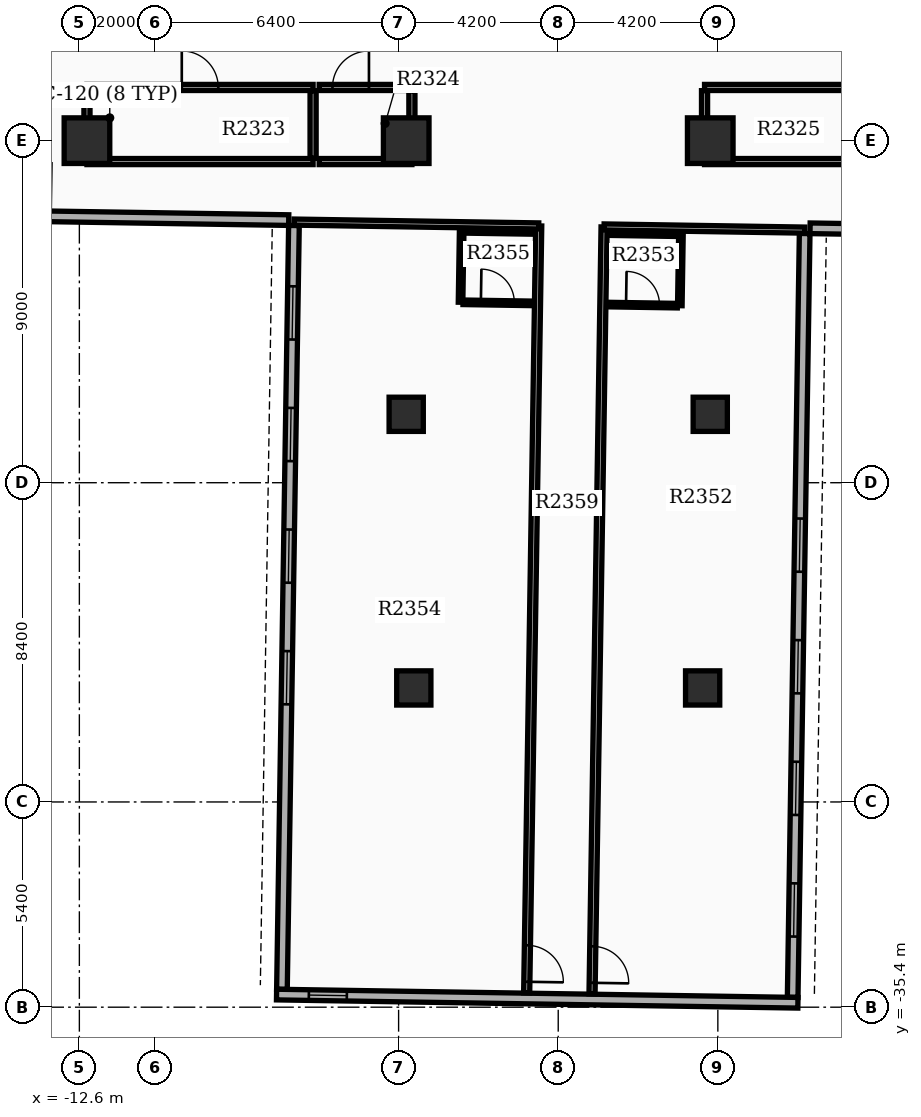
"""IFC4 building model, lengths in metres.
Left out: names, types, materials, properties, quantities, classifications, styles, units other than length and angle.
Written with IfcOpenShell. Run it as: python <this file> out.ifc"""

import sys

from ifc_helpers import new_model, si_unit, direction, frame, frame_2d, origin, origin_2d, place, context, subcontext, project, spatial, rectangle, extrude, element, fill, save


model = new_model("IFC4")
c1 = context("Model", 3, precision=1e-05, world=origin(), true_north=direction((0.0, 1.0)))
c2 = subcontext(c1, "Body", "Model", "MODEL_VIEW")
j1 = project(units=[si_unit("LENGTHUNIT", "METRE"), si_unit("PLANEANGLEUNIT", "RADIAN")], contexts=[c1])
p1 = place(None, origin())
s1 = spatial("IfcSite", under=j1, at=p1, CompositionType="ELEMENT")
p2 = place(p1, origin())
s2 = spatial("IfcBuilding", under=s1, at=p2, CompositionType="ELEMENT")
p3 = place(p2, frame((0.0, 0.0, 148.8)))
s3 = spatial("IfcBuildingStorey", under=s2, at=p3, CompositionType="ELEMENT", Elevation=148.8)
for number, where, z_axis, x_axis in (
    (1, (-12.4, -12.6, 0.0), (0.0, 0.0, 1.0), (1.0, 0.0, 0.0)),
    (2, (-4.0, -12.6, 0.0), (0.0, 0.0, 1.0), (1.0, 0.0, 0.0)),
    (3, (4.0, -12.6, 0.0), (0.0, 0.0, 1.0), (1.0, 0.0, 0.0)),
):
    element("IfcColumn", number, at=place(p3, frame(where, z_axis=z_axis, x_axis=x_axis)), inside=s3, PredefinedType="COLUMN", context=c2, shape_type="SweptSolid", body=[
        extrude(rectangle(XDim=1.2, YDim=1.2, at=origin_2d()), origin(), (0.0, 0.0, 1.0), 3.9),
    ])
for number, where, z_axis, x_axis in (
    (4, (-4.0, -19.8, 0.0), (0.0, 0.0, 1.0), (1.0, 0.0, 0.0)),
    (5, (4.0, -19.8, 0.0), (0.0, 0.0, 1.0), (1.0, 0.0, 0.0)),
    (6, (-3.8, -27.0, 0.0), (0.0, 0.0, 1.0), (1.0, 0.0, 0.0)),
    (7, (3.8, -27.0, 0.0), (0.0, 0.0, 1.0), (1.0, 0.0, 0.0)),
):
    element("IfcColumn", number, at=place(p3, frame(where, z_axis=z_axis, x_axis=x_axis)), inside=s3, PredefinedType="COLUMN", context=c2, shape_type="SweptSolid", body=[
        extrude(rectangle(XDim=0.9, YDim=0.9, at=origin_2d()), origin(), (0.0, 0.0, 1.0), 3.9),
    ])
p4 = place(p3, frame((-6.954, -14.833, 0.0), z_axis=(0.0, 0.0, 1.0), x_axis=(-0.015705059908, -0.999876667941, 0.0)))
e8 = element("IfcWall", 8, at=p4, inside=s3, PredefinedType="STANDARD", context=c2, shape_type="SweptSolid", body=[
    extrude(rectangle(XDim=20.1, YDim=0.28, at=frame_2d((10.05, 0.0))), origin(), (0.0, 0.0, 1.0), 2.97),
])
p5 = place(p4, frame((1.6, 0.0, 0.8)))
e9 = element("IfcOpeningElement", 9, at=p5, cuts=e8, PredefinedType="OPENING", context=c2, shape_type="SweptSolid", body=[
    extrude(rectangle(XDim=1.4, YDim=1.6, at=frame_2d((0.7, 0.8))), frame((0.0, 0.15, 0.0), z_axis=(0.0, -1.0, 0.0), x_axis=(1.0, 0.0, 0.0)), (0.0, 0.0, 1.0), 0.3),
])
p6 = place(p4, frame((4.8, 0.0, 0.8)))
e10 = element("IfcOpeningElement", 10, at=p6, cuts=e8, PredefinedType="OPENING", context=c2, shape_type="SweptSolid", body=[
    extrude(rectangle(XDim=1.4, YDim=1.6, at=frame_2d((0.7, 0.8))), frame((0.0, 0.15, 0.0), z_axis=(0.0, -1.0, 0.0), x_axis=(1.0, 0.0, 0.0)), (0.0, 0.0, 1.0), 0.3),
])
p7 = place(p4, frame((8.0, 0.0, 0.8)))
e11 = element("IfcOpeningElement", 11, at=p7, cuts=e8, PredefinedType="OPENING", context=c2, shape_type="SweptSolid", body=[
    extrude(rectangle(XDim=1.4, YDim=1.6, at=frame_2d((0.7, 0.8))), frame((0.0, 0.15, 0.0), z_axis=(0.0, -1.0, 0.0), x_axis=(1.0, 0.0, 0.0)), (0.0, 0.0, 1.0), 0.3),
])
p8 = place(p4, frame((11.2, 0.0, 0.8)))
e12 = element("IfcOpeningElement", 12, at=p8, cuts=e8, PredefinedType="OPENING", context=c2, shape_type="SweptSolid", body=[
    extrude(rectangle(XDim=1.4, YDim=1.6, at=frame_2d((0.7, 0.8))), frame((0.0, 0.15, 0.0), z_axis=(0.0, -1.0, 0.0), x_axis=(1.0, 0.0, 0.0)), (0.0, 0.0, 1.0), 0.3),
])
p9 = place(p3, frame((6.169, -35.141, 0.0), z_axis=(0.0, 0.0, 1.0), x_axis=(0.01571739401, 0.999876474133, 0.0)))
e13 = element("IfcWall", 13, at=p9, inside=s3, PredefinedType="STANDARD", context=c2, shape_type="SweptSolid", body=[
    extrude(rectangle(XDim=20.1, YDim=0.28, at=frame_2d((10.05, 0.0))), origin(), (0.0, 0.0, 1.0), 2.97),
])
p10 = place(p9, frame((1.6, 0.0, 0.8)))
e14 = element("IfcOpeningElement", 14, at=p10, cuts=e13, PredefinedType="OPENING", context=c2, shape_type="SweptSolid", body=[
    extrude(rectangle(XDim=1.4, YDim=1.6, at=frame_2d((0.7, 0.8))), frame((0.0, 0.15, 0.0), z_axis=(0.0, -1.0, 0.0), x_axis=(1.0, 0.0, 0.0)), (0.0, 0.0, 1.0), 0.3),
])
p11 = place(p9, frame((4.8, 0.0, 0.8)))
e15 = element("IfcOpeningElement", 15, at=p11, cuts=e13, PredefinedType="OPENING", context=c2, shape_type="SweptSolid", body=[
    extrude(rectangle(XDim=1.4, YDim=1.6, at=frame_2d((0.7, 0.8))), frame((0.0, 0.15, 0.0), z_axis=(0.0, -1.0, 0.0), x_axis=(1.0, 0.0, 0.0)), (0.0, 0.0, 1.0), 0.3),
])
p12 = place(p9, frame((8.0, 0.0, 0.8)))
e16 = element("IfcOpeningElement", 16, at=p12, cuts=e13, PredefinedType="OPENING", context=c2, shape_type="SweptSolid", body=[
    extrude(rectangle(XDim=1.4, YDim=1.6, at=frame_2d((0.7, 0.8))), frame((0.0, 0.15, 0.0), z_axis=(0.0, -1.0, 0.0), x_axis=(1.0, 0.0, 0.0)), (0.0, 0.0, 1.0), 0.3),
])
p13 = place(p9, frame((11.2, 0.0, 0.8)))
e17 = element("IfcOpeningElement", 17, at=p13, cuts=e13, PredefinedType="OPENING", context=c2, shape_type="SweptSolid", body=[
    extrude(rectangle(XDim=1.4, YDim=1.6, at=frame_2d((0.7, 0.8))), frame((0.0, 0.15, 0.0), z_axis=(0.0, -1.0, 0.0), x_axis=(1.0, 0.0, 0.0)), (0.0, 0.0, 1.0), 0.3),
])
p14 = place(p3, frame((-7.412, -35.068, 0.0), z_axis=(0.0, 0.0, 1.0), x_axis=(0.999876549481, -0.015712599986, 0.0)))
e18 = element("IfcWall", 18, at=p14, inside=s3, PredefinedType="STANDARD", context=c2, shape_type="SweptSolid", body=[
    extrude(rectangle(XDim=13.72, YDim=0.28, at=frame_2d((6.86, 0.0))), origin(), (0.0, 0.0, 1.0), 2.97),
])
p15 = place(p14, frame((0.85, 0.0, 0.85)))
e19 = element("IfcOpeningElement", 19, at=p15, cuts=e18, PredefinedType="OPENING", context=c2, shape_type="SweptSolid", body=[
    extrude(rectangle(XDim=1.0, YDim=1.5, at=frame_2d((0.5, 0.75))), frame((0.0, 0.15, 0.0), z_axis=(0.0, -1.0, 0.0), x_axis=(1.0, 0.0, 0.0)), (0.0, 0.0, 1.0), 0.3),
])
p16 = place(p3, frame((-13.391, -14.592, 0.0), z_axis=(0.0, 0.0, 1.0), x_axis=(0.999876833368, -0.015694524359, 0.0)))
e20 = element("IfcWall", 20, at=p16, inside=s3, PredefinedType="STANDARD", context=c2, shape_type="SweptSolid", body=[
    extrude(rectangle(XDim=6.3, YDim=0.28, at=frame_2d((3.15, 0.0))), origin(), (0.0, 0.0, 1.0), 2.97),
])
p17 = place(p3, frame((12.926, -15.005, 0.0), z_axis=(0.0, 0.0, 1.0), x_axis=(-0.999876823822, 0.015695132501, 0.0)))
e21 = element("IfcWall", 21, at=p17, inside=s3, PredefinedType="STANDARD", context=c2, shape_type="SweptSolid", body=[
    extrude(rectangle(XDim=6.3, YDim=0.28, at=frame_2d((3.15, 0.0))), origin(), (0.0, 0.0, 1.0), 2.97),
])
p18 = place(p3, frame((-12.4, -13.15, 0.0), z_axis=(0.0, 0.0, 1.0), x_axis=(1.0, 0.0, 0.0)))
e22 = element("IfcWall", 22, at=p18, inside=s3, PredefinedType="PARTITIONING", context=c2, shape_type="SweptSolid", body=[
    extrude(rectangle(XDim=5.95, YDim=0.16, at=frame_2d((2.975, 0.0))), origin(), (0.0, 0.0, 1.0), 2.96),
])
p19 = place(p3, frame((-12.4, -11.2, 0.0), z_axis=(0.0, 0.0, 1.0), x_axis=(1.0, 0.0, 0.0)))
e23 = element("IfcWall", 23, at=p19, inside=s3, PredefinedType="PARTITIONING", context=c2, shape_type="SweptSolid", body=[
    extrude(rectangle(XDim=5.95, YDim=0.16, at=frame_2d((2.975, 0.0))), origin(), (0.0, 0.0, 1.0), 2.96),
])
p20 = place(p19, frame((2.495, 0.0, 0.0)))
e24 = element("IfcOpeningElement", 24, at=p20, cuts=e23, PredefinedType="OPENING", context=c2, shape_type="SweptSolid", body=[
    extrude(rectangle(XDim=0.96, YDim=2.15, at=frame_2d((0.48, 1.075))), frame((0.0, 0.09, 0.0), z_axis=(0.0, -1.0, 0.0), x_axis=(1.0, 0.0, 0.0)), (0.0, 0.0, 1.0), 0.18),
])
for number, where, z_axis, x_axis in (
    (25, (-12.4, -13.065, 0.0), (0.0, 0.0, 1.0), (0.0, 1.0, 0.0)),
    (26, (-6.45, -13.065, 0.0), (0.0, 0.0, 1.0), (0.0, 1.0, 0.0)),
):
    element("IfcWall", number, at=place(p3, frame(where, z_axis=z_axis, x_axis=x_axis)), inside=s3, PredefinedType="PARTITIONING", context=c2, shape_type="SweptSolid", body=[
        extrude(rectangle(XDim=1.78, YDim=0.16, at=frame_2d((0.89, 0.0))), origin(), (0.0, 0.0, 1.0), 2.96),
    ])
p21 = place(p3, frame((-6.29, -13.15, 0.0), z_axis=(0.0, 0.0, 1.0), x_axis=(1.0, 0.0, 0.0)))
e27 = element("IfcWall", 27, at=p21, inside=s3, PredefinedType="PARTITIONING", context=c2, shape_type="SweptSolid", body=[
    extrude(rectangle(XDim=2.44, YDim=0.16, at=frame_2d((1.22, 0.0))), origin(), (0.0, 0.0, 1.0), 2.96),
])
p22 = place(p3, frame((-6.29, -11.2, 0.0), z_axis=(0.0, 0.0, 1.0), x_axis=(1.0, 0.0, 0.0)))
e28 = element("IfcWall", 28, at=p22, inside=s3, PredefinedType="PARTITIONING", context=c2, shape_type="SweptSolid", body=[
    extrude(rectangle(XDim=2.44, YDim=0.16, at=frame_2d((1.22, 0.0))), origin(), (0.0, 0.0, 1.0), 2.96),
])
p23 = place(p22, frame((0.35, 0.0, 0.0)))
e29 = element("IfcOpeningElement", 29, at=p23, cuts=e28, PredefinedType="OPENING", context=c2, shape_type="SweptSolid", body=[
    extrude(rectangle(XDim=0.96, YDim=2.15, at=frame_2d((0.48, 1.075))), frame((0.0, 0.09, 0.0), z_axis=(0.0, -1.0, 0.0), x_axis=(1.0, 0.0, 0.0)), (0.0, 0.0, 1.0), 0.18),
])
p24 = place(p3, frame((-3.85, -13.065, 0.0), z_axis=(0.0, 0.0, 1.0), x_axis=(0.0, 1.0, 0.0)))
e30 = element("IfcWall", 30, at=p24, inside=s3, PredefinedType="PARTITIONING", context=c2, shape_type="SweptSolid", body=[
    extrude(rectangle(XDim=1.78, YDim=0.16, at=frame_2d((0.89, 0.0))), origin(), (0.0, 0.0, 1.0), 2.96),
])
p25 = place(p3, frame((3.85, -13.15, 0.0), z_axis=(0.0, 0.0, 1.0), x_axis=(1.0, 0.0, 0.0)))
e31 = element("IfcWall", 31, at=p25, inside=s3, PredefinedType="PARTITIONING", context=c2, shape_type="SweptSolid", body=[
    extrude(rectangle(XDim=8.55, YDim=0.16, at=frame_2d((4.275, 0.0))), origin(), (0.0, 0.0, 1.0), 2.96),
])
p26 = place(p3, frame((3.85, -11.2, 0.0), z_axis=(0.0, 0.0, 1.0), x_axis=(1.0, 0.0, 0.0)))
e32 = element("IfcWall", 32, at=p26, inside=s3, PredefinedType="PARTITIONING", context=c2, shape_type="SweptSolid", body=[
    extrude(rectangle(XDim=8.55, YDim=0.16, at=frame_2d((4.275, 0.0))), origin(), (0.0, 0.0, 1.0), 2.96),
])
p27 = place(p26, frame((3.795, 0.0, 0.0)))
e33 = element("IfcOpeningElement", 33, at=p27, cuts=e32, PredefinedType="OPENING", context=c2, shape_type="SweptSolid", body=[
    extrude(rectangle(XDim=0.96, YDim=2.15, at=frame_2d((0.48, 1.075))), frame((0.0, 0.09, 0.0), z_axis=(0.0, -1.0, 0.0), x_axis=(1.0, 0.0, 0.0)), (0.0, 0.0, 1.0), 0.18),
])
p28 = place(p3, frame((3.85, -13.065, 0.0), z_axis=(0.0, 0.0, 1.0), x_axis=(0.0, 1.0, 0.0)))
e34 = element("IfcWall", 34, at=p28, inside=s3, PredefinedType="PARTITIONING", context=c2, shape_type="SweptSolid", body=[
    extrude(rectangle(XDim=1.78, YDim=0.16, at=frame_2d((0.89, 0.0))), origin(), (0.0, 0.0, 1.0), 2.96),
])
p29 = place(p3, frame((1.207, -14.871, 0.0), z_axis=(0.0, 0.0, 1.0), x_axis=(-0.015713987169, -0.999876527681, 0.0)))
e35 = element("IfcWall", 35, at=p29, inside=s3, PredefinedType="PARTITIONING", context=c2, shape_type="SweptSolid", body=[
    extrude(rectangle(XDim=20.182, YDim=0.16, at=frame_2d((10.091, 0.0))), origin(), (0.0, 0.0, 1.0), 2.96),
])
p30 = place(p29, frame((18.93, 0.0, 0.0)))
e36 = element("IfcOpeningElement", 36, at=p30, cuts=e35, PredefinedType="OPENING", context=c2, shape_type="SweptSolid", body=[
    extrude(rectangle(XDim=0.96, YDim=2.15, at=frame_2d((0.48, 1.075))), frame((0.0, 0.09, 0.0), z_axis=(0.0, -1.0, 0.0), x_axis=(1.0, 0.0, 0.0)), (0.0, 0.0, 1.0), 0.18),
])
p31 = place(p3, frame((1.207, -14.871, 0.0), z_axis=(0.0, 0.0, 1.0), x_axis=(0.999877138082, -0.015675099418, 0.0)))
e37 = element("IfcWall", 37, at=p31, inside=s3, PredefinedType="PARTITIONING", context=c2, shape_type="SweptSolid", body=[
    extrude(rectangle(XDim=5.28, YDim=0.16, at=frame_2d((2.64, 0.0))), origin(), (0.0, 0.0, 1.0), 2.96),
])
p32 = place(p3, frame((1.314, -16.913, 0.0), z_axis=(0.0, 0.0, 1.0), x_axis=(0.999874722342, -0.015828443418, 0.0)))
e38 = element("IfcWall", 38, at=p32, inside=s3, PredefinedType="PARTITIONING", context=c2, shape_type="SweptSolid", body=[
    extrude(rectangle(XDim=1.82, YDim=0.12, at=frame_2d((0.91, 0.0))), origin(), (0.0, 0.0, 1.0), 2.96),
])
p33 = place(p32, frame((0.47, 0.0, 0.0)))
e39 = element("IfcOpeningElement", 39, at=p33, cuts=e38, PredefinedType="OPENING", context=c2, shape_type="SweptSolid", body=[
    extrude(rectangle(XDim=0.88, YDim=2.1, at=frame_2d((0.44, 1.05))), frame((0.0, 0.07, 0.0), z_axis=(0.0, -1.0, 0.0), x_axis=(1.0, 0.0, 0.0)), (0.0, 0.0, 1.0), 0.14),
])
p34 = place(p3, frame((1.344, -15.033, 0.0), z_axis=(0.0, 0.0, 1.0), x_axis=(0.999876836305, -0.015694337248, 0.0)))
e40 = element("IfcWall", 40, at=p34, inside=s3, PredefinedType="PARTITIONING", context=c2, shape_type="SweptSolid", body=[
    extrude(rectangle(XDim=1.82, YDim=0.12, at=frame_2d((0.91, 0.0))), origin(), (0.0, 0.0, 1.0), 2.96),
])
p35 = place(p3, frame((3.229, -15.062, 0.0), z_axis=(0.0, 0.0, 1.0), x_axis=(-0.01571234584, -0.999876553475, 0.0)))
e41 = element("IfcWall", 41, at=p35, inside=s3, PredefinedType="PARTITIONING", context=c2, shape_type="SweptSolid", body=[
    extrude(rectangle(XDim=1.88, YDim=0.12, at=frame_2d((0.94, 0.0))), origin(), (0.0, 0.0, 1.0), 2.96),
])
p36 = place(p3, frame((-0.513, -14.844, 0.0), z_axis=(0.0, 0.0, 1.0), x_axis=(-0.015701893165, -0.999876717676, 0.0)))
e42 = element("IfcWall", 42, at=p36, inside=s3, PredefinedType="PARTITIONING", context=c2, shape_type="SweptSolid", body=[
    extrude(rectangle(XDim=20.182, YDim=0.16, at=frame_2d((10.091, 0.0))), origin(), (0.0, 0.0, 1.0), 2.96),
])
p37 = place(p36, frame((18.93, 0.0, 0.0)))
e43 = element("IfcOpeningElement", 43, at=p37, cuts=e42, PredefinedType="OPENING", context=c2, shape_type="SweptSolid", body=[
    extrude(rectangle(XDim=0.96, YDim=2.15, at=frame_2d((0.48, 1.075))), frame((0.0, 0.09, 0.0), z_axis=(0.0, -1.0, 0.0), x_axis=(1.0, 0.0, 0.0)), (0.0, 0.0, 1.0), 0.18),
])
p38 = place(p3, frame((-0.513, -14.844, 0.0), z_axis=(0.0, 0.0, 1.0), x_axis=(-0.99987682984, 0.015694749102, 0.0)))
e44 = element("IfcWall", 44, at=p38, inside=s3, PredefinedType="PARTITIONING", context=c2, shape_type="SweptSolid", body=[
    extrude(rectangle(XDim=6.44, YDim=0.16, at=frame_2d((3.22, 0.0))), origin(), (0.0, 0.0, 1.0), 2.96),
])
p39 = place(p3, frame((-2.505, -16.853, 0.0), z_axis=(0.0, 0.0, 1.0), x_axis=(0.999876803258, -0.015696442504, 0.0)))
e45 = element("IfcWall", 45, at=p39, inside=s3, PredefinedType="PARTITIONING", context=c2, shape_type="SweptSolid", body=[
    extrude(rectangle(XDim=1.82, YDim=0.12, at=frame_2d((0.91, 0.0))), origin(), (0.0, 0.0, 1.0), 2.96),
])
p40 = place(p39, frame((0.47, 0.0, 0.0)))
e46 = element("IfcOpeningElement", 46, at=p40, cuts=e45, PredefinedType="OPENING", context=c2, shape_type="SweptSolid", body=[
    extrude(rectangle(XDim=0.88, YDim=2.1, at=frame_2d((0.44, 1.05))), frame((0.0, 0.07, 0.0), z_axis=(0.0, -1.0, 0.0), x_axis=(1.0, 0.0, 0.0)), (0.0, 0.0, 1.0), 0.14),
])
p41 = place(p3, frame((-2.476, -14.973, 0.0), z_axis=(0.0, 0.0, 1.0), x_axis=(0.999874722342, -0.015828443418, 0.0)))
e47 = element("IfcWall", 47, at=p41, inside=s3, PredefinedType="PARTITIONING", context=c2, shape_type="SweptSolid", body=[
    extrude(rectangle(XDim=1.82, YDim=0.12, at=frame_2d((0.91, 0.0))), origin(), (0.0, 0.0, 1.0), 2.96),
])
p42 = place(p3, frame((-2.541, -14.972, 0.0), z_axis=(0.0, 0.0, 1.0), x_axis=(-0.01571234584, -0.999876553475, 0.0)))
e48 = element("IfcWall", 48, at=p42, inside=s3, PredefinedType="PARTITIONING", context=c2, shape_type="SweptSolid", body=[
    extrude(rectangle(XDim=1.88, YDim=0.12, at=frame_2d((0.94, 0.0))), origin(), (0.0, 0.0, 1.0), 2.96),
])
p43 = place(p5, origin())
e49 = element("IfcWindow", 49, at=p43, inside=s3, PartitioningType="SINGLE_PANEL", PredefinedType="WINDOW", context=c2, shape_type="SweptSolid", body=[
    extrude(rectangle(XDim=1.4, YDim=1.6, at=frame_2d((0.7, 0.8))), frame((0.0, 0.03, 0.0), z_axis=(0.0, -1.0, 0.0), x_axis=(1.0, 0.0, 0.0)), (0.0, 0.0, 1.0), 0.06),
])
fill(e9, e49)
p44 = place(p6, origin())
e50 = element("IfcWindow", 50, at=p44, inside=s3, PartitioningType="SINGLE_PANEL", PredefinedType="WINDOW", context=c2, shape_type="SweptSolid", body=[
    extrude(rectangle(XDim=1.4, YDim=1.6, at=frame_2d((0.7, 0.8))), frame((0.0, 0.03, 0.0), z_axis=(0.0, -1.0, 0.0), x_axis=(1.0, 0.0, 0.0)), (0.0, 0.0, 1.0), 0.06),
])
fill(e10, e50)
p45 = place(p7, origin())
e51 = element("IfcWindow", 51, at=p45, inside=s3, PartitioningType="SINGLE_PANEL", PredefinedType="WINDOW", context=c2, shape_type="SweptSolid", body=[
    extrude(rectangle(XDim=1.4, YDim=1.6, at=frame_2d((0.7, 0.8))), frame((0.0, 0.03, 0.0), z_axis=(0.0, -1.0, 0.0), x_axis=(1.0, 0.0, 0.0)), (0.0, 0.0, 1.0), 0.06),
])
fill(e11, e51)
p46 = place(p8, origin())
e52 = element("IfcWindow", 52, at=p46, inside=s3, PartitioningType="SINGLE_PANEL", PredefinedType="WINDOW", context=c2, shape_type="SweptSolid", body=[
    extrude(rectangle(XDim=1.4, YDim=1.6, at=frame_2d((0.7, 0.8))), frame((0.0, 0.03, 0.0), z_axis=(0.0, -1.0, 0.0), x_axis=(1.0, 0.0, 0.0)), (0.0, 0.0, 1.0), 0.06),
])
fill(e12, e52)
p47 = place(p10, origin())
e53 = element("IfcWindow", 53, at=p47, inside=s3, PartitioningType="SINGLE_PANEL", PredefinedType="WINDOW", context=c2, shape_type="SweptSolid", body=[
    extrude(rectangle(XDim=1.4, YDim=1.6, at=frame_2d((0.7, 0.8))), frame((0.0, 0.03, 0.0), z_axis=(0.0, -1.0, 0.0), x_axis=(1.0, 0.0, 0.0)), (0.0, 0.0, 1.0), 0.06),
])
fill(e14, e53)
p48 = place(p11, origin())
e54 = element("IfcWindow", 54, at=p48, inside=s3, PartitioningType="SINGLE_PANEL", PredefinedType="WINDOW", context=c2, shape_type="SweptSolid", body=[
    extrude(rectangle(XDim=1.4, YDim=1.6, at=frame_2d((0.7, 0.8))), frame((0.0, 0.03, 0.0), z_axis=(0.0, -1.0, 0.0), x_axis=(1.0, 0.0, 0.0)), (0.0, 0.0, 1.0), 0.06),
])
fill(e15, e54)
p49 = place(p12, origin())
e55 = element("IfcWindow", 55, at=p49, inside=s3, PartitioningType="SINGLE_PANEL", PredefinedType="WINDOW", context=c2, shape_type="SweptSolid", body=[
    extrude(rectangle(XDim=1.4, YDim=1.6, at=frame_2d((0.7, 0.8))), frame((0.0, 0.03, 0.0), z_axis=(0.0, -1.0, 0.0), x_axis=(1.0, 0.0, 0.0)), (0.0, 0.0, 1.0), 0.06),
])
fill(e16, e55)
p50 = place(p13, origin())
e56 = element("IfcWindow", 56, at=p50, inside=s3, PartitioningType="SINGLE_PANEL", PredefinedType="WINDOW", context=c2, shape_type="SweptSolid", body=[
    extrude(rectangle(XDim=1.4, YDim=1.6, at=frame_2d((0.7, 0.8))), frame((0.0, 0.03, 0.0), z_axis=(0.0, -1.0, 0.0), x_axis=(1.0, 0.0, 0.0)), (0.0, 0.0, 1.0), 0.06),
])
fill(e17, e56)
p51 = place(p15, origin())
e57 = element("IfcWindow", 57, at=p51, inside=s3, PartitioningType="SINGLE_PANEL", PredefinedType="WINDOW", context=c2, shape_type="SweptSolid", body=[
    extrude(rectangle(XDim=1.0, YDim=1.5, at=frame_2d((0.5, 0.75))), frame((0.0, 0.03, 0.0), z_axis=(0.0, -1.0, 0.0), x_axis=(1.0, 0.0, 0.0)), (0.0, 0.0, 1.0), 0.06),
])
fill(e19, e57)
p52 = place(p20, origin())
e58 = element("IfcDoor", 58, at=p52, inside=s3, OperationType="SINGLE_SWING_LEFT", PredefinedType="DOOR", context=c2, shape_type="SweptSolid", body=[
    extrude(rectangle(XDim=0.96, YDim=2.15, at=frame_2d((0.48, 1.075))), frame((0.0, 0.025, 0.0), z_axis=(0.0, -1.0, 0.0), x_axis=(1.0, 0.0, 0.0)), (0.0, 0.0, 1.0), 0.05),
])
fill(e24, e58)
p53 = place(p23, origin())
e59 = element("IfcDoor", 59, at=p53, inside=s3, OperationType="SINGLE_SWING_RIGHT", PredefinedType="DOOR", context=c2, shape_type="SweptSolid", body=[
    extrude(rectangle(XDim=0.96, YDim=2.15, at=frame_2d((0.48, 1.075))), frame((0.0, 0.025, 0.0), z_axis=(0.0, -1.0, 0.0), x_axis=(1.0, 0.0, 0.0)), (0.0, 0.0, 1.0), 0.05),
])
fill(e29, e59)
p54 = place(p30, origin())
e60 = element("IfcDoor", 60, at=p54, inside=s3, OperationType="SINGLE_SWING_RIGHT", PredefinedType="DOOR", context=c2, shape_type="SweptSolid", body=[
    extrude(rectangle(XDim=0.96, YDim=2.15, at=frame_2d((0.48, 1.075))), frame((0.0, 0.025, 0.0), z_axis=(0.0, -1.0, 0.0), x_axis=(1.0, 0.0, 0.0)), (0.0, 0.0, 1.0), 0.05),
])
fill(e36, e60)
p55 = place(p33, origin())
e61 = element("IfcDoor", 61, at=p55, inside=s3, OperationType="SINGLE_SWING_LEFT", PredefinedType="DOOR", context=c2, shape_type="SweptSolid", body=[
    extrude(rectangle(XDim=0.88, YDim=2.1, at=frame_2d((0.44, 1.05))), frame((0.0, 0.025, 0.0), z_axis=(0.0, -1.0, 0.0), x_axis=(1.0, 0.0, 0.0)), (0.0, 0.0, 1.0), 0.05),
])
fill(e39, e61)
p56 = place(p37, origin())
e62 = element("IfcDoor", 62, at=p56, inside=s3, OperationType="SINGLE_SWING_RIGHT", PredefinedType="DOOR", context=c2, shape_type="SweptSolid", body=[
    extrude(rectangle(XDim=0.96, YDim=2.15, at=frame_2d((0.48, 1.075))), frame((0.0, 0.025, 0.0), z_axis=(0.0, -1.0, 0.0), x_axis=(1.0, 0.0, 0.0)), (0.0, 0.0, 1.0), 0.05),
])
fill(e43, e62)
p57 = place(p40, origin())
e63 = element("IfcDoor", 63, at=p57, inside=s3, OperationType="SINGLE_SWING_LEFT", PredefinedType="DOOR", context=c2, shape_type="SweptSolid", body=[
    extrude(rectangle(XDim=0.88, YDim=2.1, at=frame_2d((0.44, 1.05))), frame((0.0, 0.025, 0.0), z_axis=(0.0, -1.0, 0.0), x_axis=(1.0, 0.0, 0.0)), (0.0, 0.0, 1.0), 0.05),
])
fill(e46, e63)
save(model, sys.argv[1])
